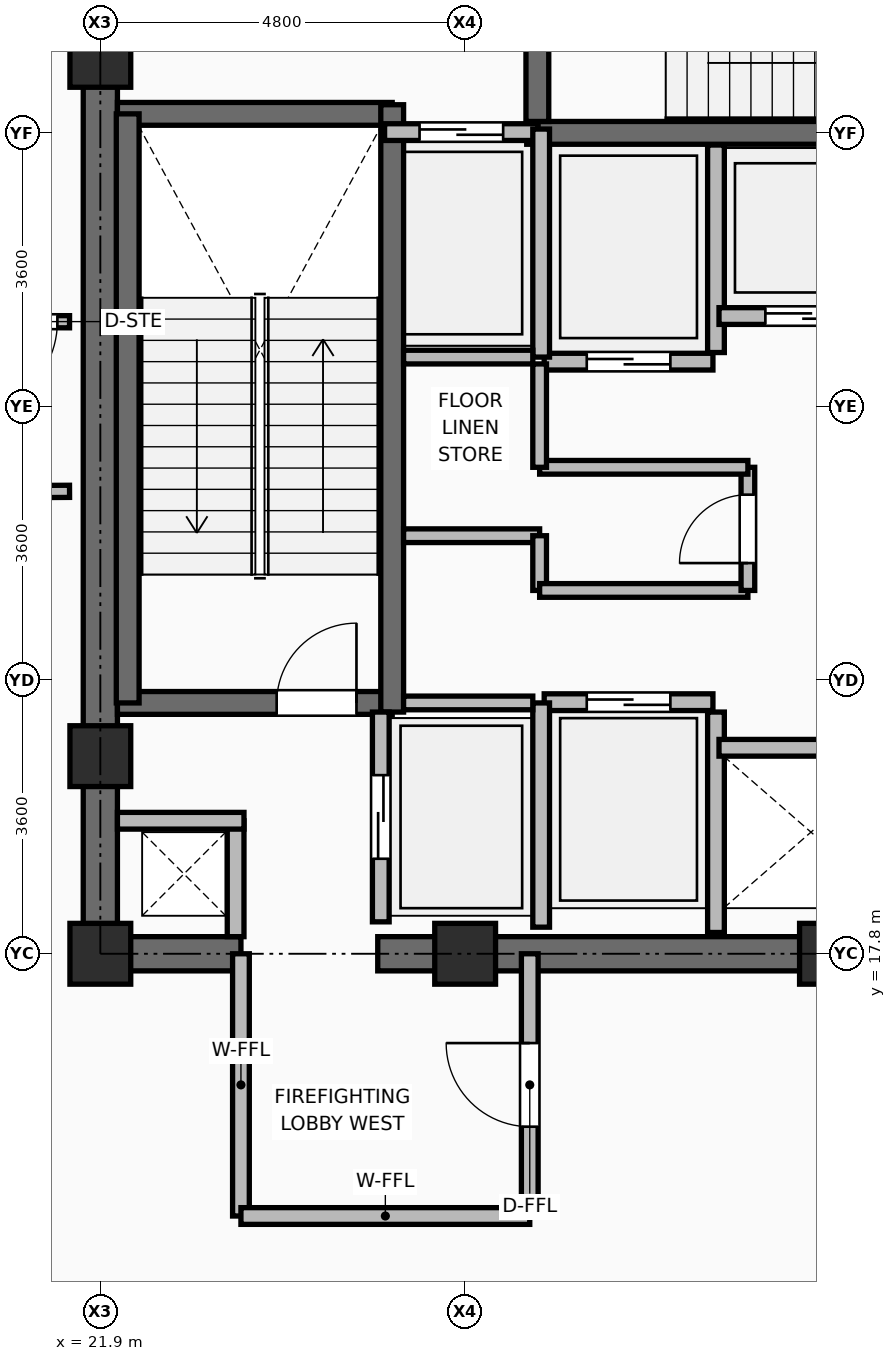
"""IFC4 building model, lengths in metres.
Left out: names, types, materials, properties, quantities, classifications, styles, units other than length and angle.
Written with IfcOpenShell. Run it as: python <this file> out.ifc"""

import sys

from ifc_helpers import new_model, si_unit, direction, frame, frame_2d, origin, origin_2d, place, context, subcontext, project, spatial, rectangle, extrude, element, fill, save


model = new_model("IFC4")
c1 = context("Model", 3, precision=1e-05, world=origin(), true_north=direction((0.0, 1.0)))
c2 = subcontext(c1, "Body", "Model", "MODEL_VIEW")
j1 = project(units=[si_unit("LENGTHUNIT", "METRE"), si_unit("PLANEANGLEUNIT", "RADIAN")], contexts=[c1])
p1 = place(None, origin())
s1 = spatial("IfcSite", under=j1, at=p1, CompositionType="ELEMENT")
p2 = place(p1, origin())
s2 = spatial("IfcBuilding", under=s1, at=p2, CompositionType="ELEMENT")
p3 = place(p2, frame((0.0, 0.0, 181.35)))
s3 = spatial("IfcBuildingStorey", under=s2, at=p3, CompositionType="ELEMENT", Elevation=181.35)
for number, where, z_axis, x_axis in (
    (1, (21.9, 17.8, 0.0), (0.0, 0.0, 1.0), (1.0, 0.0, 0.0)),
    (2, (26.7, 17.8, 0.0), (0.0, 0.0, 1.0), (1.0, 0.0, 0.0)),
    (3, (31.5, 17.8, 0.0), (0.0, 0.0, 1.0), (1.0, 0.0, 0.0)),
    (4, (21.9, 20.4, 0.0), (0.0, 0.0, 1.0), (1.0, 0.0, 0.0)),
    (5, (21.9, 29.6, 0.0), (0.0, 0.0, 1.0), (1.0, 0.0, 0.0)),
):
    element("IfcColumn", number, at=place(p3, frame(where, z_axis=z_axis, x_axis=x_axis)), inside=s3, PredefinedType="COLUMN", context=c2, shape_type="SweptSolid", body=[
        extrude(rectangle(XDim=0.8, YDim=0.8, at=origin_2d()), origin(), (0.0, 0.0, 1.0), 4.8),
    ])
p4 = place(p3, frame((30.0, 18.08, 0.0), z_axis=(0.0, 0.0, 1.0), x_axis=(0.0, 1.0, 0.0)))
e6 = element("IfcWall", 6, at=p4, inside=s3, PredefinedType="PARTITIONING", context=c2, shape_type="SweptSolid", body=[
    extrude(rectangle(XDim=2.9, YDim=0.22, at=frame_2d((1.45, 0.0))), origin(), (0.0, 0.0, 1.0), 4.595),
])
p5 = place(p3, frame((30.0, 25.71, 0.0), z_axis=(0.0, 0.0, 1.0), x_axis=(0.0, 1.0, 0.0)))
e7 = element("IfcWall", 7, at=p5, inside=s3, PredefinedType="PARTITIONING", context=c2, shape_type="SweptSolid", body=[
    extrude(rectangle(XDim=2.73, YDim=0.22, at=frame_2d((1.365, 0.0))), origin(), (0.0, 0.0, 1.0), 4.595),
])
p6 = place(p3, frame((21.675, 17.8, 0.0), z_axis=(0.0, 0.0, 1.0), x_axis=(1.0, 0.0, 0.0)))
e8 = element("IfcWall", 8, at=p6, inside=s3, PredefinedType="SHEAR", context=c2, shape_type="SweptSolid", body=[
    extrude(rectangle(XDim=2.075, YDim=0.45, at=frame_2d((1.038, 0.0))), origin(), (0.0, 0.0, 1.0), 4.62),
])
p7 = place(p3, frame((25.55, 17.8, 0.0), z_axis=(0.0, 0.0, 1.0), x_axis=(1.0, 0.0, 0.0)))
e9 = element("IfcWall", 9, at=p7, inside=s3, PredefinedType="SHEAR", context=c2, shape_type="SweptSolid", body=[
    extrude(rectangle(XDim=6.9, YDim=0.45, at=frame_2d((3.45, 0.0))), origin(), (0.0, 0.0, 1.0), 4.62),
])
p8 = place(p3, frame((21.9, 18.025, 0.0), z_axis=(0.0, 0.0, 1.0), x_axis=(0.0, 1.0, 0.0)))
e10 = element("IfcWall", 10, at=p8, inside=s3, PredefinedType="SHEAR", context=c2, shape_type="SweptSolid", body=[
    extrude(rectangle(XDim=14.2, YDim=0.45, at=frame_2d((7.1, 0.0))), origin(), (0.0, 0.0, 1.0), 4.62),
])
p9 = place(p3, frame((22.125, 21.1, 0.0), z_axis=(0.0, 0.0, 1.0), x_axis=(1.0, 0.0, 0.0)))
e11 = element("IfcWall", 11, at=p9, inside=s3, PredefinedType="SHEAR", context=c2, shape_type="SweptSolid", body=[
    extrude(rectangle(XDim=3.615, YDim=0.3, at=frame_2d((1.808, 0.0))), origin(), (0.0, 0.0, 1.0), 4.62),
])
p10 = place(p9, frame((2.095, 0.0, 0.0)))
e12 = element("IfcOpeningElement", 12, at=p10, cuts=e11, PredefinedType="OPENING", context=c2, shape_type="SweptSolid", body=[
    extrude(rectangle(XDim=1.05, YDim=2.1, at=frame_2d((0.525, 1.05))), frame((0.0, 0.16, 0.0), z_axis=(0.0, -1.0, 0.0), x_axis=(1.0, 0.0, 0.0)), (0.0, 0.0, 1.0), 0.32),
])
p11 = place(p3, frame((22.125, 28.85, 0.0), z_axis=(0.0, 0.0, 1.0), x_axis=(1.0, 0.0, 0.0)))
e13 = element("IfcWall", 13, at=p11, inside=s3, PredefinedType="SHEAR", context=c2, shape_type="SweptSolid", body=[
    extrude(rectangle(XDim=3.615, YDim=0.3, at=frame_2d((1.808, 0.0))), origin(), (0.0, 0.0, 1.0), 4.62),
])
p12 = place(p3, frame((25.74, 20.98, 0.0), z_axis=(0.0, 0.0, 1.0), x_axis=(0.0, 1.0, 0.0)))
e14 = element("IfcWall", 14, at=p12, inside=s3, PredefinedType="SHEAR", context=c2, shape_type="SweptSolid", body=[
    extrude(rectangle(XDim=7.99, YDim=0.3, at=frame_2d((3.995, 0.0))), origin(), (0.0, 0.0, 1.0), 4.62),
])
p13 = place(p3, frame((22.26, 21.1, 0.0), z_axis=(0.0, 0.0, 1.0), x_axis=(0.0, 1.0, 0.0)))
e15 = element("IfcWall", 15, at=p13, inside=s3, PredefinedType="SHEAR", context=c2, shape_type="SweptSolid", body=[
    extrude(rectangle(XDim=7.75, YDim=0.3, at=frame_2d((3.875, 0.0))), origin(), (0.0, 0.0, 1.0), 4.62),
])
p14 = place(p3, frame((27.51, 28.6, 0.0), z_axis=(0.0, 0.0, 1.0), x_axis=(1.0, 0.0, 0.0)))
e16 = element("IfcWall", 16, at=p14, inside=s3, PredefinedType="SHEAR", context=c2, shape_type="SweptSolid", body=[
    extrude(rectangle(XDim=8.03, YDim=0.3, at=frame_2d((4.015, 0.0))), origin(), (0.0, 0.0, 1.0), 4.62),
])
p15 = place(p3, frame((27.65, 28.75, 0.0), z_axis=(0.0, 0.0, 1.0), x_axis=(0.0, 1.0, 0.0)))
e17 = element("IfcWall", 17, at=p15, inside=s3, PredefinedType="SHEAR", context=c2, shape_type="SweptSolid", body=[
    extrude(rectangle(XDim=3.475, YDim=0.3, at=frame_2d((1.738, 0.0))), origin(), (0.0, 0.0, 1.0), 4.62),
])
p16 = place(p15, frame((1.0, 0.0, 0.0)))
e18 = element("IfcOpeningElement", 18, at=p16, cuts=e17, PredefinedType="OPENING", context=c2, shape_type="SweptSolid", body=[
    extrude(rectangle(XDim=1.05, YDim=2.1, at=frame_2d((0.525, 1.05))), frame((0.0, 0.16, 0.0), z_axis=(0.0, -1.0, 0.0), x_axis=(1.0, 0.0, 0.0)), (0.0, 0.0, 1.0), 0.32),
])
p17 = place(p3, frame((23.68, 18.025, 0.0), z_axis=(0.0, 0.0, 1.0), x_axis=(0.0, 1.0, 0.0)))
e19 = element("IfcWall", 19, at=p17, inside=s3, PredefinedType="PARTITIONING", context=c2, shape_type="SweptSolid", body=[
    extrude(rectangle(XDim=1.525, YDim=0.22, at=frame_2d((0.763, 0.0))), origin(), (0.0, 0.0, 1.0), 4.6),
])
p18 = place(p3, frame((22.125, 19.55, 0.0), z_axis=(0.0, 0.0, 1.0), x_axis=(1.0, 0.0, 0.0)))
e20 = element("IfcWall", 20, at=p18, inside=s3, PredefinedType="PARTITIONING", context=c2, shape_type="SweptSolid", body=[
    extrude(rectangle(XDim=1.665, YDim=0.22, at=frame_2d((0.833, 0.0))), origin(), (0.0, 0.0, 1.0), 3.645),
])
p19 = place(p3, frame((25.59, 18.22, 0.0), z_axis=(0.0, 0.0, 1.0), x_axis=(0.0, 1.0, 0.0)))
e21 = element("IfcWall", 21, at=p19, inside=s3, PredefinedType="PARTITIONING", context=c2, shape_type="SweptSolid", body=[
    extrude(rectangle(XDim=2.76, YDim=0.22, at=frame_2d((1.38, 0.0))), origin(), (0.0, 0.0, 1.0), 4.6),
])
p20 = place(p19, frame((0.83, 0.0, 0.0)))
e22 = element("IfcOpeningElement", 22, at=p20, cuts=e21, PredefinedType="OPENING", context=c2, shape_type="SweptSolid", body=[
    extrude(rectangle(XDim=1.1, YDim=2.2, at=frame_2d((0.55, 1.1))), frame((0.0, 0.12, 0.0), z_axis=(0.0, -1.0, 0.0), x_axis=(1.0, 0.0, 0.0)), (0.0, 0.0, 1.0), 0.24),
])
p21 = place(p3, frame((25.64, 28.61, 0.0), z_axis=(0.0, 0.0, 1.0), x_axis=(1.0, 0.0, 0.0)))
e23 = element("IfcWall", 23, at=p21, inside=s3, PredefinedType="PARTITIONING", context=c2, shape_type="SweptSolid", body=[
    extrude(rectangle(XDim=2.02, YDim=0.22, at=frame_2d((1.01, 0.0))), origin(), (0.0, 0.0, 1.0), 4.6),
])
p22 = place(p21, frame((0.46, 0.0, 0.0)))
e24 = element("IfcOpeningElement", 24, at=p22, cuts=e23, PredefinedType="OPENING", context=c2, shape_type="SweptSolid", body=[
    extrude(rectangle(XDim=1.1, YDim=2.2, at=frame_2d((0.55, 1.1))), frame((0.0, 0.12, 0.0), z_axis=(0.0, -1.0, 0.0), x_axis=(1.0, 0.0, 0.0)), (0.0, 0.0, 1.0), 0.24),
])
p23 = place(p3, frame((27.74, 21.11, 0.0), z_axis=(0.0, 0.0, 1.0), x_axis=(1.0, 0.0, 0.0)))
e25 = element("IfcWall", 25, at=p23, inside=s3, PredefinedType="PARTITIONING", context=c2, shape_type="SweptSolid", body=[
    extrude(rectangle(XDim=2.22, YDim=0.22, at=frame_2d((1.11, 0.0))), origin(), (0.0, 0.0, 1.0), 4.6),
])
p24 = place(p23, frame((0.56, 0.0, 0.0)))
e26 = element("IfcOpeningElement", 26, at=p24, cuts=e25, PredefinedType="OPENING", context=c2, shape_type="SweptSolid", body=[
    extrude(rectangle(XDim=1.1, YDim=2.2, at=frame_2d((0.55, 1.1))), frame((0.0, 0.12, 0.0), z_axis=(0.0, -1.0, 0.0), x_axis=(1.0, 0.0, 0.0)), (0.0, 0.0, 1.0), 0.24),
])
p25 = place(p3, frame((27.74, 25.59, 0.0), z_axis=(0.0, 0.0, 1.0), x_axis=(1.0, 0.0, 0.0)))
e27 = element("IfcWall", 27, at=p25, inside=s3, PredefinedType="PARTITIONING", context=c2, shape_type="SweptSolid", body=[
    extrude(rectangle(XDim=2.22, YDim=0.22, at=frame_2d((1.11, 0.0))), origin(), (0.0, 0.0, 1.0), 4.6),
])
p26 = place(p25, frame((0.56, 0.0, 0.0)))
e28 = element("IfcOpeningElement", 28, at=p26, cuts=e27, PredefinedType="OPENING", context=c2, shape_type="SweptSolid", body=[
    extrude(rectangle(XDim=1.1, YDim=2.2, at=frame_2d((0.55, 1.1))), frame((0.0, 0.12, 0.0), z_axis=(0.0, -1.0, 0.0), x_axis=(1.0, 0.0, 0.0)), (0.0, 0.0, 1.0), 0.24),
])
p27 = place(p3, frame((30.04, 20.51, 0.0), z_axis=(0.0, 0.0, 1.0), x_axis=(1.0, 0.0, 0.0)))
e29 = element("IfcWall", 29, at=p27, inside=s3, PredefinedType="PARTITIONING", context=c2, shape_type="SweptSolid", body=[
    extrude(rectangle(XDim=2.42, YDim=0.22, at=frame_2d((1.21, 0.0))), origin(), (0.0, 0.0, 1.0), 4.6),
])
p28 = place(p3, frame((30.04, 26.19, 0.0), z_axis=(0.0, 0.0, 1.0), x_axis=(1.0, 0.0, 0.0)))
e30 = element("IfcWall", 30, at=p28, inside=s3, PredefinedType="PARTITIONING", context=c2, shape_type="SweptSolid", body=[
    extrude(rectangle(XDim=2.32, YDim=0.22, at=frame_2d((1.16, 0.0))), origin(), (0.0, 0.0, 1.0), 4.6),
])
p29 = place(p28, frame((0.61, 0.0, 0.0)))
e31 = element("IfcOpeningElement", 31, at=p29, cuts=e30, PredefinedType="OPENING", context=c2, shape_type="SweptSolid", body=[
    extrude(rectangle(XDim=1.1, YDim=2.2, at=frame_2d((0.55, 1.1))), frame((0.0, 0.12, 0.0), z_axis=(0.0, -1.0, 0.0), x_axis=(1.0, 0.0, 0.0)), (0.0, 0.0, 1.0), 0.24),
])
p30 = place(p3, frame((27.7, 18.15, 0.0), z_axis=(0.0, 0.0, 1.0), x_axis=(0.0, 1.0, 0.0)))
e32 = element("IfcWall", 32, at=p30, inside=s3, PredefinedType="PARTITIONING", context=c2, shape_type="SweptSolid", body=[
    extrude(rectangle(XDim=2.95, YDim=0.22, at=frame_2d((1.475, 0.0))), origin(), (0.0, 0.0, 1.0), 4.6),
])
p31 = place(p3, frame((27.7, 25.65, 0.0), z_axis=(0.0, 0.0, 1.0), x_axis=(0.0, 1.0, 0.0)))
e33 = element("IfcWall", 33, at=p31, inside=s3, PredefinedType="PARTITIONING", context=c2, shape_type="SweptSolid", body=[
    extrude(rectangle(XDim=3.0, YDim=0.22, at=frame_2d((1.5, 0.0))), origin(), (0.0, 0.0, 1.0), 4.6),
])
for number, where, z_axis, x_axis in (
    (34, (25.89, 21.1, 0.0), (0.0, 0.0, 1.0), (1.0, 0.0, 0.0)),
    (35, (25.89, 25.65, 0.0), (0.0, 0.0, 1.0), (1.0, 0.0, 0.0)),
):
    element("IfcWall", number, at=place(p3, frame(where, z_axis=z_axis, x_axis=x_axis)), inside=s3, PredefinedType="PARTITIONING", context=c2, shape_type="SweptSolid", body=[
        extrude(rectangle(XDim=1.7, YDim=0.18, at=frame_2d((0.85, 0.0))), origin(), (0.0, 0.0, 1.0), 4.6),
    ])
p32 = place(p3, frame((25.89, 23.3, 0.0), z_axis=(0.0, 0.0, 1.0), x_axis=(1.0, 0.0, 0.0)))
e36 = element("IfcWall", 36, at=p32, inside=s3, PredefinedType="PARTITIONING", context=c2, shape_type="SweptSolid", body=[
    extrude(rectangle(XDim=1.79, YDim=0.18, at=frame_2d((0.895, 0.0))), origin(), (0.0, 0.0, 1.0), 4.6),
])
p33 = place(p3, frame((27.68, 22.58, 0.0), z_axis=(0.0, 0.0, 1.0), x_axis=(0.0, 1.0, 0.0)))
e37 = element("IfcWall", 37, at=p33, inside=s3, PredefinedType="PARTITIONING", context=c2, shape_type="SweptSolid", body=[
    extrude(rectangle(XDim=0.72, YDim=0.18, at=frame_2d((0.36, 0.0))), origin(), (0.0, 0.0, 1.0), 4.6),
])
p34 = place(p3, frame((27.68, 22.58, 0.0), z_axis=(0.0, 0.0, 1.0), x_axis=(1.0, 0.0, 0.0)))
e38 = element("IfcWall", 38, at=p34, inside=s3, PredefinedType="PARTITIONING", context=c2, shape_type="SweptSolid", body=[
    extrude(rectangle(XDim=2.74, YDim=0.18, at=frame_2d((1.37, 0.0))), origin(), (0.0, 0.0, 1.0), 4.6),
])
p35 = place(p3, frame((30.42, 22.58, 0.0), z_axis=(0.0, 0.0, 1.0), x_axis=(0.0, 1.0, 0.0)))
e39 = element("IfcWall", 39, at=p35, inside=s3, PredefinedType="PARTITIONING", context=c2, shape_type="SweptSolid", body=[
    extrude(rectangle(XDim=1.62, YDim=0.18, at=frame_2d((0.81, 0.0))), origin(), (0.0, 0.0, 1.0), 4.6),
])
p36 = place(p35, frame((0.36, 0.0, 0.0)))
e40 = element("IfcOpeningElement", 40, at=p36, cuts=e39, PredefinedType="OPENING", context=c2, shape_type="SweptSolid", body=[
    extrude(rectangle(XDim=0.9, YDim=2.1, at=frame_2d((0.45, 1.05))), frame((0.0, 0.1, 0.0), z_axis=(0.0, -1.0, 0.0), x_axis=(1.0, 0.0, 0.0)), (0.0, 0.0, 1.0), 0.2),
])
p37 = place(p3, frame((27.68, 24.2, 0.0), z_axis=(0.0, 0.0, 1.0), x_axis=(1.0, 0.0, 0.0)))
e41 = element("IfcWall", 41, at=p37, inside=s3, PredefinedType="PARTITIONING", context=c2, shape_type="SweptSolid", body=[
    extrude(rectangle(XDim=2.74, YDim=0.18, at=frame_2d((1.37, 0.0))), origin(), (0.0, 0.0, 1.0), 4.6),
])
p38 = place(p3, frame((27.68, 24.2, 0.0), z_axis=(0.0, 0.0, 1.0), x_axis=(0.0, 1.0, 0.0)))
e42 = element("IfcWall", 42, at=p38, inside=s3, PredefinedType="PARTITIONING", context=c2, shape_type="SweptSolid", body=[
    extrude(rectangle(XDim=1.36, YDim=0.18, at=frame_2d((0.68, 0.0))), origin(), (0.0, 0.0, 1.0), 4.6),
])
p39 = place(p3, frame((23.75, 14.35, 0.0), z_axis=(0.0, 0.0, 1.0), x_axis=(0.0, 1.0, 0.0)))
e43 = element("IfcWall", 43, at=p39, inside=s3, PredefinedType="PARTITIONING", context=c2, shape_type="SweptSolid", body=[
    extrude(rectangle(XDim=3.45, YDim=0.22, at=frame_2d((1.725, 0.0))), origin(), (0.0, 0.0, 1.0), 4.131),
])
p40 = place(p3, frame((23.75, 14.35, 0.0), z_axis=(0.0, 0.0, 1.0), x_axis=(1.0, 0.0, 0.0)))
e44 = element("IfcWall", 44, at=p40, inside=s3, PredefinedType="PARTITIONING", context=c2, shape_type="SweptSolid", body=[
    extrude(rectangle(XDim=3.8, YDim=0.22, at=frame_2d((1.9, 0.0))), origin(), (0.0, 0.0, 1.0), 4.6),
])
p41 = place(p3, frame((27.55, 14.35, 0.0), z_axis=(0.0, 0.0, 1.0), x_axis=(0.0, 1.0, 0.0)))
e45 = element("IfcWall", 45, at=p41, inside=s3, PredefinedType="PARTITIONING", context=c2, shape_type="SweptSolid", body=[
    extrude(rectangle(XDim=3.45, YDim=0.22, at=frame_2d((1.725, 0.0))), origin(), (0.0, 0.0, 1.0), 4.131),
])
p42 = place(p41, frame((1.175, 0.0, 0.0)))
e46 = element("IfcOpeningElement", 46, at=p42, cuts=e45, PredefinedType="OPENING", context=c2, shape_type="SweptSolid", body=[
    extrude(rectangle(XDim=1.1, YDim=2.1, at=frame_2d((0.55, 1.05))), frame((0.0, 0.12, 0.0), z_axis=(0.0, -1.0, 0.0), x_axis=(1.0, 0.0, 0.0)), (0.0, 0.0, 1.0), 0.24),
])
p43 = place(p3, frame((21.495, 26.115, 0.0), z_axis=(0.0, 0.0, 1.0), x_axis=(-0.999997365931, 0.002295241113, 0.0)))
e47 = element("IfcWall", 47, at=p43, inside=s3, PredefinedType="PARTITIONING", context=c2, shape_type="SweptSolid", body=[
    extrude(rectangle(XDim=4.361, YDim=0.16, at=frame_2d((2.181, 0.0))), origin(), (0.0, 0.0, 1.0), 3.645),
])
p44 = place(p43, frame((0.16, 0.0, 0.0)))
e48 = element("IfcOpeningElement", 48, at=p44, cuts=e47, PredefinedType="OPENING", context=c2, shape_type="SweptSolid", body=[
    extrude(rectangle(XDim=1.2, YDim=2.1, at=frame_2d((0.6, 1.05))), frame((0.0, 0.09, 0.0), z_axis=(0.0, -1.0, 0.0), x_axis=(1.0, 0.0, 0.0)), (0.0, 0.0, 1.0), 0.18),
])
p45 = place(p3, frame((17.126, 23.858, 0.0), z_axis=(0.0, 0.0, 1.0), x_axis=(0.99998212632, 0.005978882852, 0.0)))
e49 = element("IfcWall", 49, at=p45, inside=s3, PredefinedType="PARTITIONING", context=c2, shape_type="SweptSolid", body=[
    extrude(rectangle(XDim=4.369, YDim=0.16, at=frame_2d((2.185, 0.0))), origin(), (0.0, 0.0, 1.0), 3.645),
])
p46 = place(p10, origin())
e50 = element("IfcDoor", 50, at=p46, inside=s3, OperationType="SINGLE_SWING_RIGHT", PredefinedType="DOOR", context=c2, shape_type="SweptSolid", body=[
    extrude(rectangle(XDim=1.05, YDim=2.1, at=frame_2d((0.525, 1.05))), frame((0.0, 0.025, 0.0), z_axis=(0.0, -1.0, 0.0), x_axis=(1.0, 0.0, 0.0)), (0.0, 0.0, 1.0), 0.05),
])
fill(e12, e50)
p47 = place(p20, origin())
e51 = element("IfcDoor", 51, at=p47, inside=s3, OperationType="DOUBLE_DOOR_SLIDING", PredefinedType="DOOR", context=c2, shape_type="SweptSolid", body=[
    extrude(rectangle(XDim=1.1, YDim=2.2, at=frame_2d((0.55, 1.1))), frame((0.0, 0.025, 0.0), z_axis=(0.0, -1.0, 0.0), x_axis=(1.0, 0.0, 0.0)), (0.0, 0.0, 1.0), 0.05),
])
fill(e22, e51)
p48 = place(p22, origin())
e52 = element("IfcDoor", 52, at=p48, inside=s3, OperationType="DOUBLE_DOOR_SLIDING", PredefinedType="DOOR", context=c2, shape_type="SweptSolid", body=[
    extrude(rectangle(XDim=1.1, YDim=2.2, at=frame_2d((0.55, 1.1))), frame((0.0, 0.025, 0.0), z_axis=(0.0, -1.0, 0.0), x_axis=(1.0, 0.0, 0.0)), (0.0, 0.0, 1.0), 0.05),
])
fill(e24, e52)
p49 = place(p24, origin())
e53 = element("IfcDoor", 53, at=p49, inside=s3, OperationType="DOUBLE_DOOR_SLIDING", PredefinedType="DOOR", context=c2, shape_type="SweptSolid", body=[
    extrude(rectangle(XDim=1.1, YDim=2.2, at=frame_2d((0.55, 1.1))), frame((0.0, 0.025, 0.0), z_axis=(0.0, -1.0, 0.0), x_axis=(1.0, 0.0, 0.0)), (0.0, 0.0, 1.0), 0.05),
])
fill(e26, e53)
p50 = place(p26, frame((1.1, 0.0, 0.0), z_axis=(0.0, 0.0, 1.0), x_axis=(-1.0, 0.0, 0.0)))
e54 = element("IfcDoor", 54, at=p50, inside=s3, OperationType="DOUBLE_DOOR_SLIDING", PredefinedType="DOOR", context=c2, shape_type="SweptSolid", body=[
    extrude(rectangle(XDim=1.1, YDim=2.2, at=frame_2d((0.55, 1.1))), frame((0.0, 0.025, 0.0), z_axis=(0.0, -1.0, 0.0), x_axis=(1.0, 0.0, 0.0)), (0.0, 0.0, 1.0), 0.05),
])
fill(e28, e54)
p51 = place(p29, frame((1.1, 0.0, 0.0), z_axis=(0.0, 0.0, 1.0), x_axis=(-1.0, 0.0, 0.0)))
e55 = element("IfcDoor", 55, at=p51, inside=s3, OperationType="DOUBLE_DOOR_SLIDING", PredefinedType="DOOR", context=c2, shape_type="SweptSolid", body=[
    extrude(rectangle(XDim=1.1, YDim=2.2, at=frame_2d((0.55, 1.1))), frame((0.0, 0.025, 0.0), z_axis=(0.0, -1.0, 0.0), x_axis=(1.0, 0.0, 0.0)), (0.0, 0.0, 1.0), 0.05),
])
fill(e31, e55)
p52 = place(p36, origin())
e56 = element("IfcDoor", 56, at=p52, inside=s3, OperationType="SINGLE_SWING_LEFT", PredefinedType="DOOR", context=c2, shape_type="SweptSolid", body=[
    extrude(rectangle(XDim=0.9, YDim=2.1, at=frame_2d((0.45, 1.05))), frame((0.0, 0.025, 0.0), z_axis=(0.0, -1.0, 0.0), x_axis=(1.0, 0.0, 0.0)), (0.0, 0.0, 1.0), 0.05),
])
fill(e40, e56)
p53 = place(p42, origin())
e57 = element("IfcDoor", 57, at=p53, inside=s3, OperationType="SINGLE_SWING_RIGHT", PredefinedType="DOOR", context=c2, shape_type="SweptSolid", body=[
    extrude(rectangle(XDim=1.1, YDim=2.1, at=frame_2d((0.55, 1.05))), frame((0.0, 0.025, 0.0), z_axis=(0.0, -1.0, 0.0), x_axis=(1.0, 0.0, 0.0)), (0.0, 0.0, 1.0), 0.05),
])
fill(e46, e57)
p54 = place(p44, origin())
e58 = element("IfcDoor", 58, at=p54, inside=s3, OperationType="SINGLE_SWING_RIGHT", PredefinedType="DOOR", context=c2, shape_type="SweptSolid", body=[
    extrude(rectangle(XDim=1.2, YDim=2.1, at=frame_2d((0.6, 1.05))), frame((0.0, 0.025, 0.0), z_axis=(0.0, -1.0, 0.0), x_axis=(1.0, 0.0, 0.0)), (0.0, 0.0, 1.0), 0.05),
])
fill(e48, e58)
save(model, sys.argv[1])
